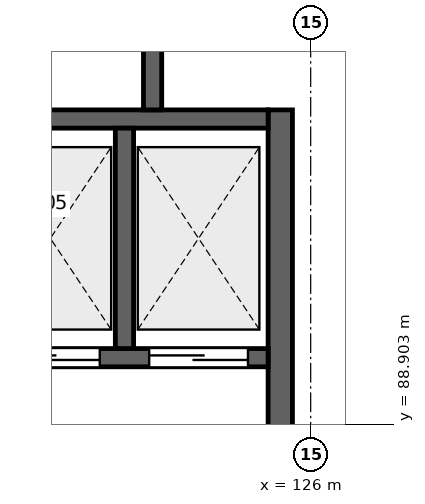
"""IFC4 building model, lengths in metres.
Left out: names, types, materials, properties, quantities, classifications, styles, units other than length and angle.
Written with IfcOpenShell. Run it as: python <this file> out.ifc"""

import sys

from ifc_helpers import new_model, si_unit, direction, frame, frame_2d, origin, place, context, subcontext, project, spatial, rectangle, extrude, element, fill, save


model = new_model("IFC4")
c1 = context("Model", 3, precision=1e-05, world=origin(), true_north=direction((0.0, 1.0)))
c2 = subcontext(c1, "Body", "Model", "MODEL_VIEW")
j1 = project(units=[si_unit("LENGTHUNIT", "METRE"), si_unit("PLANEANGLEUNIT", "RADIAN")], contexts=[c1])
p1 = place(None, origin())
s1 = spatial("IfcSite", under=j1, at=p1, CompositionType="ELEMENT")
p2 = place(p1, origin())
s2 = spatial("IfcBuilding", under=s1, at=p2, CompositionType="ELEMENT")
p3 = place(p2, frame((0.0, 0.0, -4.5)))
s3 = spatial("IfcBuildingStorey", under=s2, at=p3, CompositionType="ELEMENT", Elevation=-4.5)
p4 = place(p3, frame((125.6, 84.0, 0.0), z_axis=(0.0, 0.0, 1.0), x_axis=(0.0, 1.0, 0.0)))
e1 = element("IfcWall", 1, at=p4, inside=s3, PredefinedType="SHEAR", context=c2, shape_type="SweptSolid", body=[
    extrude(rectangle(XDim=9.04, YDim=0.32, at=frame_2d((4.52, 0.0))), origin(), (0.0, 0.0, 1.0), 4.16),
])
p5 = place(p3, frame((121.54, 89.78, 0.0), z_axis=(0.0, 0.0, 1.0), x_axis=(1.0, 0.0, 0.0)))
e2 = element("IfcWall", 2, at=p5, inside=s3, PredefinedType="SHEAR", context=c2, shape_type="SweptSolid", body=[
    extrude(rectangle(XDim=3.9, YDim=0.24, at=frame_2d((1.95, 0.0))), origin(), (0.0, 0.0, 1.0), 4.31),
])
p6 = place(p5, frame((0.385, 0.0, 0.0)))
e3 = element("IfcOpeningElement", 3, at=p6, cuts=e2, PredefinedType="OPENING", context=c2, shape_type="SweptSolid", body=[
    extrude(rectangle(XDim=1.3, YDim=2.2, at=frame_2d((0.65, 1.1))), frame((0.0, 0.135, 0.0), z_axis=(0.0, -1.0, 0.0), x_axis=(1.0, 0.0, 0.0)), (0.0, 0.0, 1.0), 0.27),
])
p7 = place(p5, frame((2.335, 0.0, 0.0)))
e4 = element("IfcOpeningElement", 4, at=p7, cuts=e2, PredefinedType="OPENING", context=c2, shape_type="SweptSolid", body=[
    extrude(rectangle(XDim=1.3, YDim=2.2, at=frame_2d((0.65, 1.1))), frame((0.0, 0.135, 0.0), z_axis=(0.0, -1.0, 0.0), x_axis=(1.0, 0.0, 0.0)), (0.0, 0.0, 1.0), 0.27),
])
p8 = place(p3, frame((121.54, 92.92, 0.0), z_axis=(0.0, 0.0, 1.0), x_axis=(1.0, 0.0, 0.0)))
e5 = element("IfcWall", 5, at=p8, inside=s3, PredefinedType="SHEAR", context=c2, shape_type="SweptSolid", body=[
    extrude(rectangle(XDim=3.9, YDim=0.24, at=frame_2d((1.95, 0.0))), origin(), (0.0, 0.0, 1.0), 4.31),
])
p9 = place(p3, frame((123.55, 89.9, 0.0), z_axis=(0.0, 0.0, 1.0), x_axis=(0.0, 1.0, 0.0)))
e6 = element("IfcWall", 6, at=p9, inside=s3, PredefinedType="SHEAR", context=c2, shape_type="SweptSolid", body=[
    extrude(rectangle(XDim=2.9, YDim=0.24, at=frame_2d((1.45, 0.0))), origin(), (0.0, 0.0, 1.0), 4.31),
])
p10 = place(p3, frame((123.92, 93.04, 0.0), z_axis=(0.0, 0.0, 1.0), x_axis=(0.0, 1.0, 0.0)))
e7 = element("IfcWall", 7, at=p10, inside=s3, PredefinedType="SHEAR", context=c2, shape_type="SweptSolid", body=[
    extrude(rectangle(XDim=2.0, YDim=0.24, at=frame_2d((1.0, 0.0))), origin(), (0.0, 0.0, 1.0), 4.31),
])
p11 = place(p6, origin())
e8 = element("IfcDoor", 8, at=p11, inside=s3, OperationType="DOUBLE_DOOR_SLIDING", PredefinedType="DOOR", context=c2, shape_type="SweptSolid", body=[
    extrude(rectangle(XDim=1.3, YDim=2.2, at=frame_2d((0.65, 1.1))), frame((0.0, 0.025, 0.0), z_axis=(0.0, -1.0, 0.0), x_axis=(1.0, 0.0, 0.0)), (0.0, 0.0, 1.0), 0.05),
])
fill(e3, e8)
p12 = place(p7, origin())
e9 = element("IfcDoor", 9, at=p12, inside=s3, OperationType="DOUBLE_DOOR_SLIDING", PredefinedType="DOOR", context=c2, shape_type="SweptSolid", body=[
    extrude(rectangle(XDim=1.3, YDim=2.2, at=frame_2d((0.65, 1.1))), frame((0.0, 0.025, 0.0), z_axis=(0.0, -1.0, 0.0), x_axis=(1.0, 0.0, 0.0)), (0.0, 0.0, 1.0), 0.05),
])
fill(e4, e9)
save(model, sys.argv[1])
